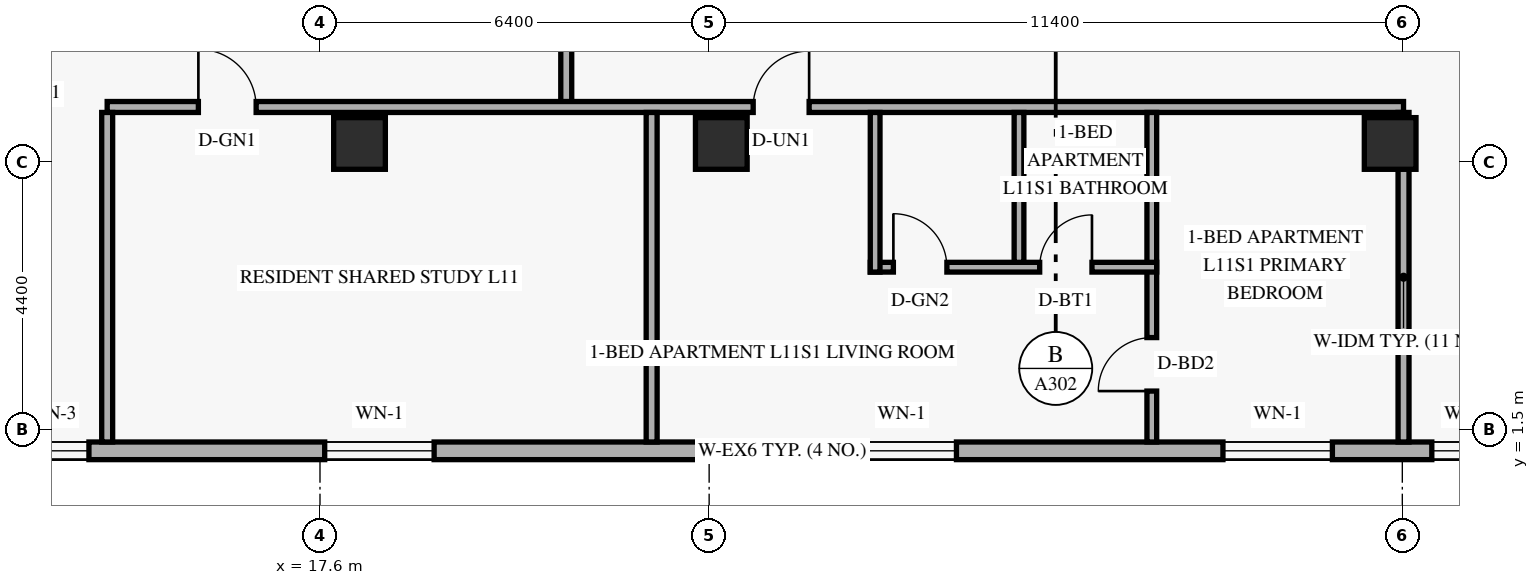
"""IFC4 building model, lengths in metres.
Left out: names, types, materials, properties, quantities, classifications, styles, units other than length and angle.
Written with IfcOpenShell. Run it as: python <this file> out.ifc"""

import sys

from ifc_helpers import new_model, si_unit, direction, frame, frame_2d, origin, origin_2d, place, context, subcontext, project, spatial, rectangle, extrude, element, fill, save


model = new_model("IFC4")
c1 = context("Model", 3, precision=1e-05, world=origin(), true_north=direction((0.0, 1.0)))
c2 = subcontext(c1, "Body", "Model", "MODEL_VIEW")
j1 = project(units=[si_unit("LENGTHUNIT", "METRE"), si_unit("PLANEANGLEUNIT", "RADIAN")], contexts=[c1])
p1 = place(None, origin())
s1 = spatial("IfcSite", under=j1, at=p1, CompositionType="ELEMENT")
p2 = place(p1, origin())
s2 = spatial("IfcBuilding", under=s1, at=p2, CompositionType="ELEMENT")
p3 = place(p2, frame((0.0, 0.0, 45.6)))
s3 = spatial("IfcBuildingStorey", under=s2, at=p3, CompositionType="ELEMENT", Elevation=45.6)
for number, where, z_axis, x_axis in (
    (1, (18.25, 6.2, 0.0), (0.0, 0.0, 1.0), (1.0, 0.0, 0.0)),
    (2, (24.2, 6.2, 0.0), (0.0, 0.0, 1.0), (1.0, 0.0, 0.0)),
    (3, (35.2, 6.2, 0.0), (0.0, 0.0, 1.0), (1.0, 0.0, 0.0)),
):
    element("IfcColumn", number, at=place(p3, frame(where, z_axis=z_axis, x_axis=x_axis)), inside=s3, PredefinedType="COLUMN", context=c2, shape_type="SweptSolid", body=[
        extrude(rectangle(XDim=0.85, YDim=0.85, at=origin_2d()), origin(), (0.0, 0.0, 1.0), 3.6),
    ])
p4 = place(p3, frame((5.42, 1.145, 0.0), z_axis=(0.0, 0.0, 1.0), x_axis=(1.0, 0.0, 0.0)))
e4 = element("IfcWall", 4, at=p4, inside=s3, PredefinedType="SOLIDWALL", context=c2, shape_type="SweptSolid", body=[
    extrude(rectangle(XDim=39.56, YDim=0.29, at=frame_2d((19.78, 0.0))), origin(), (0.0, 0.0, 1.0), 3.36),
])
p5 = place(p4, frame((2.54, 0.0, 0.85)))
e5 = element("IfcOpeningElement", 5, at=p5, cuts=e4, PredefinedType="OPENING", context=c2, shape_type="SweptSolid", body=[
    extrude(rectangle(XDim=1.8, YDim=1.6, at=frame_2d((0.9, 0.8))), frame((0.0, 0.155, 0.0), z_axis=(0.0, -1.0, 0.0), x_axis=(1.0, 0.0, 0.0)), (0.0, 0.0, 1.0), 0.31),
])
p6 = place(p4, frame((7.18, 0.0, 0.85)))
e6 = element("IfcOpeningElement", 6, at=p6, cuts=e4, PredefinedType="OPENING", context=c2, shape_type="SweptSolid", body=[
    extrude(rectangle(XDim=1.2, YDim=1.5, at=frame_2d((0.6, 0.75))), frame((0.0, 0.155, 0.0), z_axis=(0.0, -1.0, 0.0), x_axis=(1.0, 0.0, 0.0)), (0.0, 0.0, 1.0), 0.31),
])
p7 = place(p4, frame((12.257, 0.0, 0.85)))
e7 = element("IfcOpeningElement", 7, at=p7, cuts=e4, PredefinedType="OPENING", context=c2, shape_type="SweptSolid", body=[
    extrude(rectangle(XDim=1.8, YDim=1.6, at=frame_2d((0.9, 0.8))), frame((0.0, 0.155, 0.0), z_axis=(0.0, -1.0, 0.0), x_axis=(1.0, 0.0, 0.0)), (0.0, 0.0, 1.0), 0.31),
])
p8 = place(p4, frame((20.847, 0.0, 0.85)))
e8 = element("IfcOpeningElement", 8, at=p8, cuts=e4, PredefinedType="OPENING", context=c2, shape_type="SweptSolid", body=[
    extrude(rectangle(XDim=1.8, YDim=1.6, at=frame_2d((0.9, 0.8))), frame((0.0, 0.155, 0.0), z_axis=(0.0, -1.0, 0.0), x_axis=(1.0, 0.0, 0.0)), (0.0, 0.0, 1.0), 0.31),
])
p9 = place(p4, frame((27.03, 0.0, 0.85)))
e9 = element("IfcOpeningElement", 9, at=p9, cuts=e4, PredefinedType="OPENING", context=c2, shape_type="SweptSolid", body=[
    extrude(rectangle(XDim=1.8, YDim=1.6, at=frame_2d((0.9, 0.8))), frame((0.0, 0.155, 0.0), z_axis=(0.0, -1.0, 0.0), x_axis=(1.0, 0.0, 0.0)), (0.0, 0.0, 1.0), 0.31),
])
p10 = place(p4, frame((30.465, 0.0, 0.85)))
e10 = element("IfcOpeningElement", 10, at=p10, cuts=e4, PredefinedType="OPENING", context=c2, shape_type="SweptSolid", body=[
    extrude(rectangle(XDim=1.2, YDim=1.5, at=frame_2d((0.6, 0.75))), frame((0.0, 0.155, 0.0), z_axis=(0.0, -1.0, 0.0), x_axis=(1.0, 0.0, 0.0)), (0.0, 0.0, 1.0), 0.31),
])
p11 = place(p4, frame((34.945, 0.0, 0.85)))
e11 = element("IfcOpeningElement", 11, at=p11, cuts=e4, PredefinedType="OPENING", context=c2, shape_type="SweptSolid", body=[
    extrude(rectangle(XDim=1.8, YDim=1.6, at=frame_2d((0.9, 0.8))), frame((0.0, 0.155, 0.0), z_axis=(0.0, -1.0, 0.0), x_axis=(1.0, 0.0, 0.0)), (0.0, 0.0, 1.0), 0.31),
])
p12 = place(p3, frame((21.65, 6.8, 0.0), z_axis=(0.0, 0.0, 1.0), x_axis=(0.0, 1.0, 0.0)))
e12 = element("IfcWall", 12, at=p12, inside=s3, PredefinedType="STANDARD", context=c2, shape_type="SweptSolid", body=[
    extrude(rectangle(XDim=34.4, YDim=0.18, at=frame_2d((17.2, 0.0))), origin(), (0.0, 0.0, 1.0), 2.649),
])
p13 = place(p3, frame((14.1, 6.8, 0.0), z_axis=(0.0, 0.0, 1.0), x_axis=(1.0, 0.0, 0.0)))
e13 = element("IfcWall", 13, at=p13, inside=s3, PredefinedType="STANDARD", context=c2, shape_type="SweptSolid", body=[
    extrude(rectangle(XDim=21.32, YDim=0.18, at=frame_2d((10.66, 0.0))), origin(), (0.0, 0.0, 1.0), 2.649),
])
p14 = place(p13, frame((1.5, 0.0, 0.0)))
e14 = element("IfcOpeningElement", 14, at=p14, cuts=e13, PredefinedType="OPENING", context=c2, shape_type="SweptSolid", body=[
    extrude(rectangle(XDim=0.95, YDim=2.15, at=frame_2d((0.475, 1.075))), frame((0.0, 0.1, 0.0), z_axis=(0.0, -1.0, 0.0), x_axis=(1.0, 0.0, 0.0)), (0.0, 0.0, 1.0), 0.2),
])
p15 = place(p13, frame((10.625, 0.0, 0.0)))
e15 = element("IfcOpeningElement", 15, at=p15, cuts=e13, PredefinedType="OPENING", context=c2, shape_type="SweptSolid", body=[
    extrude(rectangle(XDim=0.92, YDim=2.15, at=frame_2d((0.46, 1.075))), frame((0.0, 0.1, 0.0), z_axis=(0.0, -1.0, 0.0), x_axis=(1.0, 0.0, 0.0)), (0.0, 0.0, 1.0), 0.2),
])
p16 = place(p3, frame((35.42, 1.29, 0.0), z_axis=(0.0, 0.0, 1.0), x_axis=(0.0, 1.0, 0.0)))
e16 = element("IfcWall", 16, at=p16, inside=s3, PredefinedType="PARTITIONING", context=c2, shape_type="SweptSolid", body=[
    extrude(rectangle(XDim=5.42, YDim=0.18, at=frame_2d((2.71, 0.0))), origin(), (0.0, 0.0, 1.0), 3.36),
])
for number, where, z_axis, x_axis in (
    (17, (14.1, 1.29, 0.0), (0.0, 0.0, 1.0), (0.0, 1.0, 0.0)),
    (18, (23.054, 1.29, 0.0), (0.0, 0.0, 1.0), (0.0, 1.0, 0.0)),
):
    element("IfcWall", number, at=place(p3, frame(where, z_axis=z_axis, x_axis=x_axis)), inside=s3, PredefinedType="PARTITIONING", context=c2, shape_type="SweptSolid", body=[
        extrude(rectangle(XDim=5.42, YDim=0.18, at=frame_2d((2.71, 0.0))), origin(), (0.0, 0.0, 1.0), 2.809),
    ])
p17 = place(p3, frame((31.28, 1.29, 0.0), z_axis=(0.0, 0.0, 1.0), x_axis=(0.0, 1.0, 0.0)))
e19 = element("IfcWall", 19, at=p17, inside=s3, PredefinedType="PARTITIONING", context=c2, shape_type="SweptSolid", body=[
    extrude(rectangle(XDim=5.42, YDim=0.16, at=frame_2d((2.71, 0.0))), origin(), (0.0, 0.0, 1.0), 2.809),
])
p18 = place(p17, frame((0.837, 0.0, 0.0)))
e20 = element("IfcOpeningElement", 20, at=p18, cuts=e19, PredefinedType="OPENING", context=c2, shape_type="SweptSolid", body=[
    extrude(rectangle(XDim=0.88, YDim=2.14, at=frame_2d((0.44, 1.07))), frame((0.0, 0.09, 0.0), z_axis=(0.0, -1.0, 0.0), x_axis=(1.0, 0.0, 0.0)), (0.0, 0.0, 1.0), 0.18),
])
p19 = place(p3, frame((26.65, 4.165, 0.0), z_axis=(0.0, 0.0, 1.0), x_axis=(1.0, 0.0, 0.0)))
e21 = element("IfcWall", 21, at=p19, inside=s3, PredefinedType="PLUMBINGWALL", context=c2, shape_type="SweptSolid", body=[
    extrude(rectangle(XDim=4.71, YDim=0.16, at=frame_2d((2.355, 0.0))), origin(), (0.0, 0.0, 1.0), 3.36),
])
p20 = place(p19, frame((0.38, 0.0, 0.0)))
e22 = element("IfcOpeningElement", 22, at=p20, cuts=e21, PredefinedType="OPENING", context=c2, shape_type="SweptSolid", body=[
    extrude(rectangle(XDim=0.88, YDim=2.12, at=frame_2d((0.44, 1.06))), frame((0.0, 0.09, 0.0), z_axis=(0.0, -1.0, 0.0), x_axis=(1.0, 0.0, 0.0)), (0.0, 0.0, 1.0), 0.18),
])
p21 = place(p19, frame((2.786, 0.0, 0.0)))
e23 = element("IfcOpeningElement", 23, at=p21, cuts=e21, PredefinedType="OPENING", context=c2, shape_type="SweptSolid", body=[
    extrude(rectangle(XDim=0.86, YDim=2.12, at=frame_2d((0.43, 1.06))), frame((0.0, 0.09, 0.0), z_axis=(0.0, -1.0, 0.0), x_axis=(1.0, 0.0, 0.0)), (0.0, 0.0, 1.0), 0.18),
])
p22 = place(p3, frame((26.73, 4.085, 0.0), z_axis=(0.0, 0.0, 1.0), x_axis=(0.0, 1.0, 0.0)))
e24 = element("IfcWall", 24, at=p22, inside=s3, PredefinedType="PLUMBINGWALL", context=c2, shape_type="SweptSolid", body=[
    extrude(rectangle(XDim=2.625, YDim=0.16, at=frame_2d((1.312, 0.0))), origin(), (0.0, 0.0, 1.0), 2.809),
])
p23 = place(p3, frame((29.096, 4.245, 0.0), z_axis=(0.0, 0.0, 1.0), x_axis=(0.0, 1.0, 0.0)))
e25 = element("IfcWall", 25, at=p23, inside=s3, PredefinedType="PLUMBINGWALL", context=c2, shape_type="SweptSolid", body=[
    extrude(rectangle(XDim=2.465, YDim=0.16, at=frame_2d((1.232, 0.0))), origin(), (0.0, 0.0, 1.0), 2.809),
])
p24 = place(p6, origin())
e26 = element("IfcWindow", 26, at=p24, inside=s3, PartitioningType="SINGLE_PANEL", PredefinedType="WINDOW", context=c2, shape_type="SweptSolid", body=[
    extrude(rectangle(XDim=1.2, YDim=1.5, at=frame_2d((0.6, 0.75))), frame((0.0, 0.03, 0.0), z_axis=(0.0, -1.0, 0.0), x_axis=(1.0, 0.0, 0.0)), (0.0, 0.0, 1.0), 0.06),
])
fill(e6, e26)
p25 = place(p7, origin())
e27 = element("IfcWindow", 27, at=p25, inside=s3, PartitioningType="SINGLE_PANEL", PredefinedType="WINDOW", context=c2, shape_type="SweptSolid", body=[
    extrude(rectangle(XDim=1.8, YDim=1.6, at=frame_2d((0.9, 0.8))), frame((0.0, 0.03, 0.0), z_axis=(0.0, -1.0, 0.0), x_axis=(1.0, 0.0, 0.0)), (0.0, 0.0, 1.0), 0.06),
])
fill(e7, e27)
p26 = place(p8, origin())
e28 = element("IfcWindow", 28, at=p26, inside=s3, PartitioningType="SINGLE_PANEL", PredefinedType="WINDOW", context=c2, shape_type="SweptSolid", body=[
    extrude(rectangle(XDim=1.8, YDim=1.6, at=frame_2d((0.9, 0.8))), frame((0.0, 0.03, 0.0), z_axis=(0.0, -1.0, 0.0), x_axis=(1.0, 0.0, 0.0)), (0.0, 0.0, 1.0), 0.06),
])
fill(e8, e28)
p27 = place(p9, origin())
e29 = element("IfcWindow", 29, at=p27, inside=s3, PartitioningType="SINGLE_PANEL", PredefinedType="WINDOW", context=c2, shape_type="SweptSolid", body=[
    extrude(rectangle(XDim=1.8, YDim=1.6, at=frame_2d((0.9, 0.8))), frame((0.0, 0.03, 0.0), z_axis=(0.0, -1.0, 0.0), x_axis=(1.0, 0.0, 0.0)), (0.0, 0.0, 1.0), 0.06),
])
fill(e9, e29)
p28 = place(p10, origin())
e30 = element("IfcWindow", 30, at=p28, inside=s3, PartitioningType="SINGLE_PANEL", PredefinedType="WINDOW", context=c2, shape_type="SweptSolid", body=[
    extrude(rectangle(XDim=1.2, YDim=1.5, at=frame_2d((0.6, 0.75))), frame((0.0, 0.03, 0.0), z_axis=(0.0, -1.0, 0.0), x_axis=(1.0, 0.0, 0.0)), (0.0, 0.0, 1.0), 0.06),
])
fill(e10, e30)
p29 = place(p14, origin())
e31 = element("IfcDoor", 31, at=p29, inside=s3, OperationType="SINGLE_SWING_LEFT", PredefinedType="DOOR", context=c2, shape_type="SweptSolid", body=[
    extrude(rectangle(XDim=0.95, YDim=2.15, at=frame_2d((0.475, 1.075))), frame((0.0, 0.025, 0.0), z_axis=(0.0, -1.0, 0.0), x_axis=(1.0, 0.0, 0.0)), (0.0, 0.0, 1.0), 0.05),
])
fill(e14, e31)
p30 = place(p15, origin())
e32 = element("IfcDoor", 32, at=p30, inside=s3, OperationType="SINGLE_SWING_RIGHT", PredefinedType="DOOR", context=c2, shape_type="SweptSolid", body=[
    extrude(rectangle(XDim=0.92, YDim=2.15, at=frame_2d((0.46, 1.075))), frame((0.0, 0.025, 0.0), z_axis=(0.0, -1.0, 0.0), x_axis=(1.0, 0.0, 0.0)), (0.0, 0.0, 1.0), 0.05),
])
fill(e15, e32)
p31 = place(p20, origin())
e33 = element("IfcDoor", 33, at=p31, inside=s3, OperationType="SINGLE_SWING_LEFT", PredefinedType="DOOR", context=c2, shape_type="SweptSolid", body=[
    extrude(rectangle(XDim=0.88, YDim=2.12, at=frame_2d((0.44, 1.06))), frame((0.0, 0.025, 0.0), z_axis=(0.0, -1.0, 0.0), x_axis=(1.0, 0.0, 0.0)), (0.0, 0.0, 1.0), 0.05),
])
fill(e22, e33)
p32 = place(p21, origin())
e34 = element("IfcDoor", 34, at=p32, inside=s3, OperationType="SINGLE_SWING_RIGHT", PredefinedType="DOOR", context=c2, shape_type="SweptSolid", body=[
    extrude(rectangle(XDim=0.86, YDim=2.12, at=frame_2d((0.43, 1.06))), frame((0.0, 0.025, 0.0), z_axis=(0.0, -1.0, 0.0), x_axis=(1.0, 0.0, 0.0)), (0.0, 0.0, 1.0), 0.05),
])
fill(e23, e34)
p33 = place(p18, origin())
e35 = element("IfcDoor", 35, at=p33, inside=s3, OperationType="SINGLE_SWING_LEFT", PredefinedType="DOOR", context=c2, shape_type="SweptSolid", body=[
    extrude(rectangle(XDim=0.88, YDim=2.14, at=frame_2d((0.44, 1.07))), frame((0.0, 0.025, 0.0), z_axis=(0.0, -1.0, 0.0), x_axis=(1.0, 0.0, 0.0)), (0.0, 0.0, 1.0), 0.05),
])
fill(e20, e35)
save(model, sys.argv[1])
